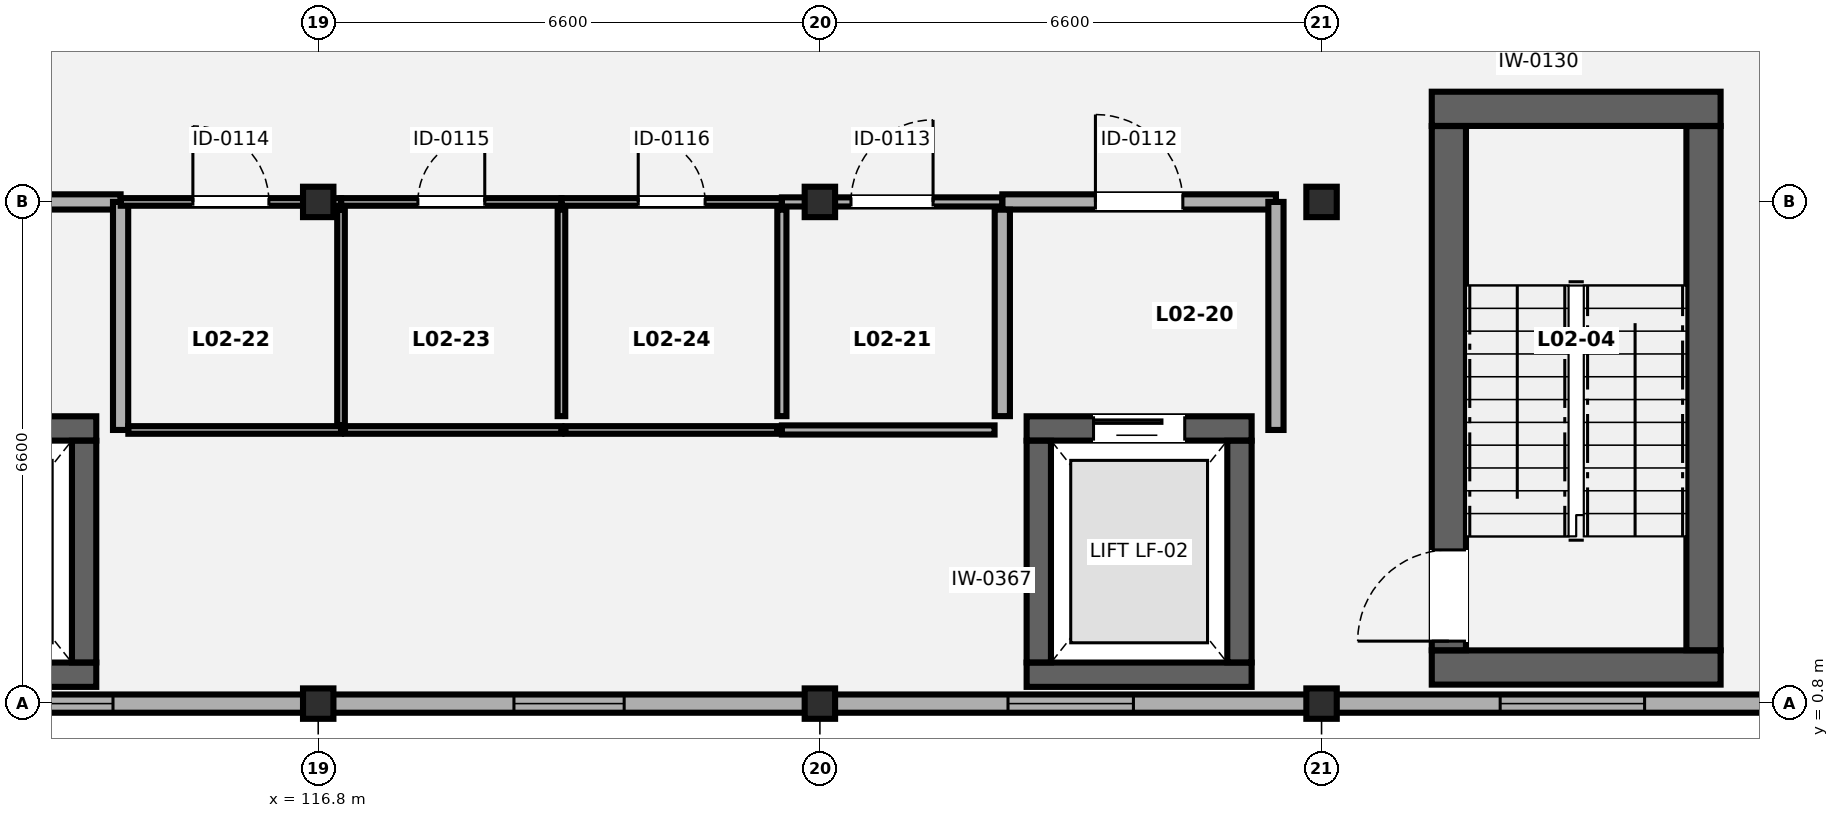
"""IFC4 building model, lengths in metres.
Left out: names, types, materials, properties, quantities, classifications, styles, units other than length and angle.
Written with IfcOpenShell. Run it as: python <this file> out.ifc"""

import sys

from ifc_helpers import new_model, si_unit, direction, frame, frame_2d, origin, origin_2d, place, context, subcontext, project, spatial, rectangle, i_section, extrude, element, fill, save


model = new_model("IFC4")
c1 = context("Model", 3, precision=1e-05, world=origin(), true_north=direction((0.0, 1.0)))
c2 = subcontext(c1, "Body", "Model", "MODEL_VIEW")
j1 = project(units=[si_unit("LENGTHUNIT", "METRE"), si_unit("PLANEANGLEUNIT", "RADIAN")], contexts=[c1])
p1 = place(None, origin())
s1 = spatial("IfcSite", under=j1, at=p1, CompositionType="ELEMENT")
p2 = place(p1, origin())
s2 = spatial("IfcBuilding", under=s1, at=p2, CompositionType="ELEMENT")
p3 = place(p2, frame((0.0, 0.0, 9.1)))
s3 = spatial("IfcBuildingStorey", under=s2, at=p3, CompositionType="ELEMENT", Elevation=9.1)
for number, where, z_axis, x_axis in (
    (1, (116.8, 0.8, 0.0), (0.0, 0.0, 1.0), (1.0, 0.0, 0.0)),
    (2, (116.8, 7.4, 0.0), (0.0, 0.0, 1.0), (1.0, 0.0, 0.0)),
    (3, (123.4, 0.8, 0.0), (0.0, 0.0, 1.0), (1.0, 0.0, 0.0)),
    (4, (123.4, 7.4, 0.0), (0.0, 0.0, 1.0), (1.0, 0.0, 0.0)),
    (5, (130.0, 0.8, 0.0), (0.0, 0.0, 1.0), (1.0, 0.0, 0.0)),
    (6, (130.0, 7.4, 0.0), (0.0, 0.0, 1.0), (1.0, 0.0, 0.0)),
):
    element("IfcColumn", number, at=place(p3, frame(where, z_axis=z_axis, x_axis=x_axis)), inside=s3, PredefinedType="COLUMN", context=c2, shape_type="SweptSolid", body=[
        extrude(i_section(OverallWidth=0.4, OverallDepth=0.4, WebThickness=0.02, FlangeThickness=0.035, FilletRadius=0.016, at=origin_2d()), origin(), (0.0, 0.0, 1.0), 4.2),
    ])
p4 = place(p3, frame((162.002, 0.8, 0.0), z_axis=(0.0, 0.0, 1.0), x_axis=(-1.0, 0.0, 0.0)))
e7 = element("IfcWall", 7, at=p4, inside=s3, PredefinedType="SOLIDWALL", context=c2, shape_type="SweptSolid", body=[
    extrude(rectangle(XDim=58.204, YDim=0.24, at=frame_2d((29.102, 0.0))), origin(), (0.0, 0.0, 1.0), 3.505),
])
p5 = place(p4, frame((53.877, 0.0, 0.85)))
e8 = element("IfcOpeningElement", 8, at=p5, cuts=e7, PredefinedType="OPENING", context=c2, shape_type="SweptSolid", body=[
    extrude(rectangle(XDim=2.45, YDim=1.4, at=frame_2d((1.225, 0.7))), frame((0.0, 0.13, 0.0), z_axis=(0.0, -1.0, 0.0), x_axis=(1.0, 0.0, 0.0)), (0.0, 0.0, 1.0), 0.26),
])
p6 = place(p4, frame((47.902, 0.0, 0.85)))
e9 = element("IfcOpeningElement", 9, at=p6, cuts=e7, PredefinedType="OPENING", context=c2, shape_type="SweptSolid", body=[
    extrude(rectangle(XDim=1.2, YDim=1.25, at=frame_2d((0.6, 0.625))), frame((0.0, 0.13, 0.0), z_axis=(0.0, -1.0, 0.0), x_axis=(1.0, 0.0, 0.0)), (0.0, 0.0, 1.0), 0.26),
])
p7 = place(p4, frame((41.177, 0.0, 0.85)))
e10 = element("IfcOpeningElement", 10, at=p7, cuts=e7, PredefinedType="OPENING", context=c2, shape_type="SweptSolid", body=[
    extrude(rectangle(XDim=1.45, YDim=1.25, at=frame_2d((0.725, 0.625))), frame((0.0, 0.13, 0.0), z_axis=(0.0, -1.0, 0.0), x_axis=(1.0, 0.0, 0.0)), (0.0, 0.0, 1.0), 0.26),
])
p8 = place(p4, frame((34.477, 0.0, 0.85)))
e11 = element("IfcOpeningElement", 11, at=p8, cuts=e7, PredefinedType="OPENING", context=c2, shape_type="SweptSolid", body=[
    extrude(rectangle(XDim=1.65, YDim=1.25, at=frame_2d((0.825, 0.625))), frame((0.0, 0.13, 0.0), z_axis=(0.0, -1.0, 0.0), x_axis=(1.0, 0.0, 0.0)), (0.0, 0.0, 1.0), 0.26),
])
p9 = place(p4, frame((27.752, 0.0, 0.85)))
e12 = element("IfcOpeningElement", 12, at=p9, cuts=e7, PredefinedType="OPENING", context=c2, shape_type="SweptSolid", body=[
    extrude(rectangle(XDim=1.9, YDim=1.25, at=frame_2d((0.95, 0.625))), frame((0.0, 0.13, 0.0), z_axis=(0.0, -1.0, 0.0), x_axis=(1.0, 0.0, 0.0)), (0.0, 0.0, 1.0), 0.26),
])
p10 = place(p4, frame((21.002, 0.0, 0.85)))
e13 = element("IfcOpeningElement", 13, at=p10, cuts=e7, PredefinedType="OPENING", context=c2, shape_type="SweptSolid", body=[
    extrude(rectangle(XDim=2.2, YDim=1.25, at=frame_2d((1.1, 0.625))), frame((0.0, 0.13, 0.0), z_axis=(0.0, -1.0, 0.0), x_axis=(1.0, 0.0, 0.0)), (0.0, 0.0, 1.0), 0.26),
])
p11 = place(p4, frame((14.252, 0.0, 0.85)))
e14 = element("IfcOpeningElement", 14, at=p11, cuts=e7, PredefinedType="OPENING", context=c2, shape_type="SweptSolid", body=[
    extrude(rectangle(XDim=2.5, YDim=1.25, at=frame_2d((1.25, 0.625))), frame((0.0, 0.13, 0.0), z_axis=(0.0, -1.0, 0.0), x_axis=(1.0, 0.0, 0.0)), (0.0, 0.0, 1.0), 0.26),
])
p12 = place(p4, frame((8.452, 0.0, 0.85)))
e15 = element("IfcOpeningElement", 15, at=p12, cuts=e7, PredefinedType="OPENING", context=c2, shape_type="SweptSolid", body=[
    extrude(rectangle(XDim=0.9, YDim=1.35, at=frame_2d((0.45, 0.675))), frame((0.0, 0.13, 0.0), z_axis=(0.0, -1.0, 0.0), x_axis=(1.0, 0.0, 0.0)), (0.0, 0.0, 1.0), 0.26),
])
p13 = place(p4, frame((2.177, 0.0, 0.85)))
e16 = element("IfcOpeningElement", 16, at=p13, cuts=e7, PredefinedType="OPENING", context=c2, shape_type="SweptSolid", body=[
    extrude(rectangle(XDim=1.05, YDim=1.35, at=frame_2d((0.525, 0.675))), frame((0.0, 0.13, 0.0), z_axis=(0.0, -1.0, 0.0), x_axis=(1.0, 0.0, 0.0)), (0.0, 0.0, 1.0), 0.26),
])
for number, where, z_axis, x_axis in (
    (17, (131.45, 1.275, 0.0), (0.0, 0.0, 1.0), (1.0, 0.0, 0.0)),
    (18, (131.45, 8.625, 0.0), (0.0, 0.0, 1.0), (1.0, 0.0, 0.0)),
):
    element("IfcWall", number, at=place(p3, frame(where, z_axis=z_axis, x_axis=x_axis)), inside=s3, PredefinedType="SHEAR", context=c2, shape_type="SweptSolid", body=[
        extrude(rectangle(XDim=3.8, YDim=0.45, at=frame_2d((1.9, 0.0))), origin(), (0.0, 0.0, 1.0), 4.02),
    ])
p14 = place(p3, frame((131.675, 1.502, 0.0), z_axis=(0.0, 0.0, 1.0), x_axis=(0.0, 1.0, 0.0)))
e19 = element("IfcWall", 19, at=p14, inside=s3, PredefinedType="SHEAR", context=c2, shape_type="SweptSolid", body=[
    extrude(rectangle(XDim=6.896, YDim=0.45, at=frame_2d((3.448, 0.0))), origin(), (0.0, 0.0, 1.0), 4.02),
])
p15 = place(p14, frame((0.12, 0.0, 0.0)))
e20 = element("IfcOpeningElement", 20, at=p15, cuts=e19, PredefinedType="OPENING", context=c2, shape_type="SweptSolid", body=[
    extrude(rectangle(XDim=1.2, YDim=2.15, at=frame_2d((0.6, 1.075))), frame((0.0, 0.235, 0.0), z_axis=(0.0, -1.0, 0.0), x_axis=(1.0, 0.0, 0.0)), (0.0, 0.0, 1.0), 0.47),
])
p16 = place(p3, frame((135.025, 1.502, 0.0), z_axis=(0.0, 0.0, 1.0), x_axis=(0.0, 1.0, 0.0)))
e21 = element("IfcWall", 21, at=p16, inside=s3, PredefinedType="SHEAR", context=c2, shape_type="SweptSolid", body=[
    extrude(rectangle(XDim=6.896, YDim=0.45, at=frame_2d((3.448, 0.0))), origin(), (0.0, 0.0, 1.0), 4.02),
])
p17 = place(p3, frame((110.92, 1.18, 0.0), z_axis=(0.0, 0.0, 1.0), x_axis=(1.0, 0.0, 0.0)))
e22 = element("IfcWall", 22, at=p17, inside=s3, PredefinedType="SHEAR", context=c2, shape_type="SweptSolid", body=[
    extrude(rectangle(XDim=2.96, YDim=0.32, at=frame_2d((1.48, 0.0))), origin(), (0.0, 0.0, 1.0), 4.02),
])
p18 = place(p3, frame((110.92, 4.42, 0.0), z_axis=(0.0, 0.0, 1.0), x_axis=(1.0, 0.0, 0.0)))
e23 = element("IfcWall", 23, at=p18, inside=s3, PredefinedType="SHEAR", context=c2, shape_type="SweptSolid", body=[
    extrude(rectangle(XDim=2.96, YDim=0.32, at=frame_2d((1.48, 0.0))), origin(), (0.0, 0.0, 1.0), 4.02),
])
p19 = place(p18, frame((0.88, 0.0, 0.0)))
e24 = element("IfcOpeningElement", 24, at=p19, cuts=e23, PredefinedType="OPENING", context=c2, shape_type="SweptSolid", body=[
    extrude(rectangle(XDim=1.2, YDim=2.2, at=frame_2d((0.6, 1.1))), frame((0.0, 0.17, 0.0), z_axis=(0.0, -1.0, 0.0), x_axis=(1.0, 0.0, 0.0)), (0.0, 0.0, 1.0), 0.34),
])
p20 = place(p3, frame((113.72, 1.342, 0.0), z_axis=(0.0, 0.0, 1.0), x_axis=(0.0, 1.0, 0.0)))
e25 = element("IfcWall", 25, at=p20, inside=s3, PredefinedType="SHEAR", context=c2, shape_type="SweptSolid", body=[
    extrude(rectangle(XDim=2.916, YDim=0.32, at=frame_2d((1.458, 0.0))), origin(), (0.0, 0.0, 1.0), 4.02),
])
p21 = place(p3, frame((126.12, 1.18, 0.0), z_axis=(0.0, 0.0, 1.0), x_axis=(1.0, 0.0, 0.0)))
e26 = element("IfcWall", 26, at=p21, inside=s3, PredefinedType="SHEAR", context=c2, shape_type="SweptSolid", body=[
    extrude(rectangle(XDim=2.96, YDim=0.32, at=frame_2d((1.48, 0.0))), origin(), (0.0, 0.0, 1.0), 4.02),
])
p22 = place(p3, frame((126.12, 4.42, 0.0), z_axis=(0.0, 0.0, 1.0), x_axis=(1.0, 0.0, 0.0)))
e27 = element("IfcWall", 27, at=p22, inside=s3, PredefinedType="SHEAR", context=c2, shape_type="SweptSolid", body=[
    extrude(rectangle(XDim=2.96, YDim=0.32, at=frame_2d((1.48, 0.0))), origin(), (0.0, 0.0, 1.0), 4.02),
])
p23 = place(p22, frame((0.88, 0.0, 0.0)))
e28 = element("IfcOpeningElement", 28, at=p23, cuts=e27, PredefinedType="OPENING", context=c2, shape_type="SweptSolid", body=[
    extrude(rectangle(XDim=1.2, YDim=2.2, at=frame_2d((0.6, 1.1))), frame((0.0, 0.17, 0.0), z_axis=(0.0, -1.0, 0.0), x_axis=(1.0, 0.0, 0.0)), (0.0, 0.0, 1.0), 0.34),
])
for number, where, z_axis, x_axis in (
    (29, (126.28, 1.342, 0.0), (0.0, 0.0, 1.0), (0.0, 1.0, 0.0)),
    (30, (128.92, 1.342, 0.0), (0.0, 0.0, 1.0), (0.0, 1.0, 0.0)),
):
    element("IfcWall", number, at=place(p3, frame(where, z_axis=z_axis, x_axis=x_axis)), inside=s3, PredefinedType="SHEAR", context=c2, shape_type="SweptSolid", body=[
        extrude(rectangle(XDim=2.916, YDim=0.32, at=frame_2d((1.458, 0.0))), origin(), (0.0, 0.0, 1.0), 4.02),
    ])
p24 = place(p3, frame((110.6, 7.4, 0.0), z_axis=(0.0, 0.0, 1.0), x_axis=(1.0, 0.0, 0.0)))
e31 = element("IfcWall", 31, at=p24, inside=s3, PredefinedType="SOLIDWALL", context=c2, shape_type="SweptSolid", body=[
    extrude(rectangle(XDim=3.6, YDim=0.2, at=frame_2d((1.8, 0.0))), origin(), (0.0, 0.0, 1.0), 3.293),
])
p25 = place(p24, frame((1.225, 0.0, 0.0)))
e32 = element("IfcOpeningElement", 32, at=p25, cuts=e31, PredefinedType="OPENING", context=c2, shape_type="SweptSolid", body=[
    extrude(rectangle(XDim=1.15, YDim=2.15, at=frame_2d((0.575, 1.075))), frame((0.0, 0.11, 0.0), z_axis=(0.0, -1.0, 0.0), x_axis=(1.0, 0.0, 0.0)), (0.0, 0.0, 1.0), 0.22),
])
p26 = place(p3, frame((114.2, 4.4, 0.0), z_axis=(0.0, 0.0, 1.0), x_axis=(0.0, 1.0, 0.0)))
e33 = element("IfcWall", 33, at=p26, inside=s3, PredefinedType="SOLIDWALL", context=c2, shape_type="SweptSolid", body=[
    extrude(rectangle(XDim=3.0, YDim=0.2, at=frame_2d((1.5, 0.0))), origin(), (0.0, 0.0, 1.0), 4.02),
])
p27 = place(p3, frame((125.8, 7.4, 0.0), z_axis=(0.0, 0.0, 1.0), x_axis=(1.0, 0.0, 0.0)))
e34 = element("IfcWall", 34, at=p27, inside=s3, PredefinedType="SOLIDWALL", context=c2, shape_type="SweptSolid", body=[
    extrude(rectangle(XDim=3.6, YDim=0.2, at=frame_2d((1.8, 0.0))), origin(), (0.0, 0.0, 1.0), 3.293),
])
p28 = place(p27, frame((1.225, 0.0, 0.0)))
e35 = element("IfcOpeningElement", 35, at=p28, cuts=e34, PredefinedType="OPENING", context=c2, shape_type="SweptSolid", body=[
    extrude(rectangle(XDim=1.15, YDim=2.15, at=frame_2d((0.575, 1.075))), frame((0.0, 0.11, 0.0), z_axis=(0.0, -1.0, 0.0), x_axis=(1.0, 0.0, 0.0)), (0.0, 0.0, 1.0), 0.22),
])
p29 = place(p3, frame((125.8, 4.582, 0.0), z_axis=(0.0, 0.0, 1.0), x_axis=(0.0, 1.0, 0.0)))
e36 = element("IfcWall", 36, at=p29, inside=s3, PredefinedType="SOLIDWALL", context=c2, shape_type="SweptSolid", body=[
    extrude(rectangle(XDim=2.716, YDim=0.2, at=frame_2d((1.358, 0.0))), origin(), (0.0, 0.0, 1.0), 4.02),
])
p30 = place(p3, frame((129.4, 4.4, 0.0), z_axis=(0.0, 0.0, 1.0), x_axis=(0.0, 1.0, 0.0)))
e37 = element("IfcWall", 37, at=p30, inside=s3, PredefinedType="SOLIDWALL", context=c2, shape_type="SweptSolid", body=[
    extrude(rectangle(XDim=3.0, YDim=0.2, at=frame_2d((1.5, 0.0))), origin(), (0.0, 0.0, 1.0), 4.02),
])
p31 = place(p3, frame((122.9, 4.4, 0.0), z_axis=(0.0, 0.0, 1.0), x_axis=(1.0, 0.0, 0.0)))
e38 = element("IfcWall", 38, at=p31, inside=s3, PredefinedType="PARTITIONING", context=c2, shape_type="SweptSolid", body=[
    extrude(rectangle(XDim=2.798, YDim=0.12, at=frame_2d((1.399, 0.0))), origin(), (0.0, 0.0, 1.0), 4.02),
])
p32 = place(p3, frame((122.9, 7.4, 0.0), z_axis=(0.0, 0.0, 1.0), x_axis=(1.0, 0.0, 0.0)))
e39 = element("IfcWall", 39, at=p32, inside=s3, PredefinedType="PARTITIONING", context=c2, shape_type="SweptSolid", body=[
    extrude(rectangle(XDim=2.898, YDim=0.12, at=frame_2d((1.449, 0.0))), origin(), (0.0, 0.0, 1.0), 3.293),
])
p33 = place(p32, frame((0.909, 0.0, 0.0)))
e40 = element("IfcOpeningElement", 40, at=p33, cuts=e39, PredefinedType="OPENING", context=c2, shape_type="SweptSolid", body=[
    extrude(rectangle(XDim=1.08, YDim=2.12, at=frame_2d((0.54, 1.06))), frame((0.0, 0.07, 0.0), z_axis=(0.0, -1.0, 0.0), x_axis=(1.0, 0.0, 0.0)), (0.0, 0.0, 1.0), 0.14),
])
p34 = place(p3, frame((122.9, 4.582, 0.0), z_axis=(0.0, 0.0, 1.0), x_axis=(0.0, 1.0, 0.0)))
e41 = element("IfcWall", 41, at=p34, inside=s3, PredefinedType="PARTITIONING", context=c2, shape_type="SweptSolid", body=[
    extrude(rectangle(XDim=2.716, YDim=0.12, at=frame_2d((1.358, 0.0))), origin(), (0.0, 0.0, 1.0), 4.02),
])
p35 = place(p3, frame((114.302, 4.4, 0.0), z_axis=(0.0, 0.0, 1.0), x_axis=(1.0, 0.0, 0.0)))
e42 = element("IfcWall", 42, at=p35, inside=s3, PredefinedType="PARTITIONING", context=c2, shape_type="SweptSolid", body=[
    extrude(rectangle(XDim=2.798, YDim=0.1, at=frame_2d((1.399, 0.0))), origin(), (0.0, 0.0, 1.0), 4.02),
])
p36 = place(p3, frame((114.202, 7.4, 0.0), z_axis=(0.0, 0.0, 1.0), x_axis=(1.0, 0.0, 0.0)))
e43 = element("IfcWall", 43, at=p36, inside=s3, PredefinedType="PARTITIONING", context=c2, shape_type="SweptSolid", body=[
    extrude(rectangle(XDim=2.898, YDim=0.1, at=frame_2d((1.449, 0.0))), origin(), (0.0, 0.0, 1.0), 3.293),
])
p37 = place(p36, frame((0.949, 0.0, 0.0)))
e44 = element("IfcOpeningElement", 44, at=p37, cuts=e43, PredefinedType="OPENING", context=c2, shape_type="SweptSolid", body=[
    extrude(rectangle(XDim=1.0, YDim=2.1, at=frame_2d((0.5, 1.05))), frame((0.0, 0.06, 0.0), z_axis=(0.0, -1.0, 0.0), x_axis=(1.0, 0.0, 0.0)), (0.0, 0.0, 1.0), 0.12),
])
p38 = place(p3, frame((117.1, 4.462, 0.0), z_axis=(0.0, 0.0, 1.0), x_axis=(0.0, 1.0, 0.0)))
e45 = element("IfcWall", 45, at=p38, inside=s3, PredefinedType="PARTITIONING", context=c2, shape_type="SweptSolid", body=[
    extrude(rectangle(XDim=2.836, YDim=0.1, at=frame_2d((1.418, 0.0))), origin(), (0.0, 0.0, 1.0), 4.02),
])
p39 = place(p3, frame((117.152, 4.4, 0.0), z_axis=(0.0, 0.0, 1.0), x_axis=(1.0, 0.0, 0.0)))
e46 = element("IfcWall", 46, at=p39, inside=s3, PredefinedType="PARTITIONING", context=c2, shape_type="SweptSolid", body=[
    extrude(rectangle(XDim=2.848, YDim=0.1, at=frame_2d((1.424, 0.0))), origin(), (0.0, 0.0, 1.0), 4.02),
])
p40 = place(p3, frame((117.102, 7.4, 0.0), z_axis=(0.0, 0.0, 1.0), x_axis=(1.0, 0.0, 0.0)))
e47 = element("IfcWall", 47, at=p40, inside=s3, PredefinedType="PARTITIONING", context=c2, shape_type="SweptSolid", body=[
    extrude(rectangle(XDim=2.898, YDim=0.1, at=frame_2d((1.449, 0.0))), origin(), (0.0, 0.0, 1.0), 3.293),
])
p41 = place(p40, frame((1.009, 0.0, 0.0)))
e48 = element("IfcOpeningElement", 48, at=p41, cuts=e47, PredefinedType="OPENING", context=c2, shape_type="SweptSolid", body=[
    extrude(rectangle(XDim=0.88, YDim=2.08, at=frame_2d((0.44, 1.04))), frame((0.0, 0.06, 0.0), z_axis=(0.0, -1.0, 0.0), x_axis=(1.0, 0.0, 0.0)), (0.0, 0.0, 1.0), 0.12),
])
p42 = place(p3, frame((120.0, 4.582, 0.0), z_axis=(0.0, 0.0, 1.0), x_axis=(0.0, 1.0, 0.0)))
e49 = element("IfcWall", 49, at=p42, inside=s3, PredefinedType="PARTITIONING", context=c2, shape_type="SweptSolid", body=[
    extrude(rectangle(XDim=2.716, YDim=0.1, at=frame_2d((1.358, 0.0))), origin(), (0.0, 0.0, 1.0), 4.02),
])
p43 = place(p3, frame((120.052, 4.4, 0.0), z_axis=(0.0, 0.0, 1.0), x_axis=(1.0, 0.0, 0.0)))
e50 = element("IfcWall", 50, at=p43, inside=s3, PredefinedType="PARTITIONING", context=c2, shape_type="SweptSolid", body=[
    extrude(rectangle(XDim=2.786, YDim=0.1, at=frame_2d((1.393, 0.0))), origin(), (0.0, 0.0, 1.0), 4.02),
])
p44 = place(p3, frame((120.002, 7.4, 0.0), z_axis=(0.0, 0.0, 1.0), x_axis=(1.0, 0.0, 0.0)))
e51 = element("IfcWall", 51, at=p44, inside=s3, PredefinedType="PARTITIONING", context=c2, shape_type="SweptSolid", body=[
    extrude(rectangle(XDim=2.896, YDim=0.1, at=frame_2d((1.448, 0.0))), origin(), (0.0, 0.0, 1.0), 3.293),
])
p45 = place(p44, frame((1.008, 0.0, 0.0)))
e52 = element("IfcOpeningElement", 52, at=p45, cuts=e51, PredefinedType="OPENING", context=c2, shape_type="SweptSolid", body=[
    extrude(rectangle(XDim=0.88, YDim=2.08, at=frame_2d((0.44, 1.04))), frame((0.0, 0.06, 0.0), z_axis=(0.0, -1.0, 0.0), x_axis=(1.0, 0.0, 0.0)), (0.0, 0.0, 1.0), 0.12),
])
p46 = place(p6, origin())
e53 = element("IfcWindow", 53, at=p46, inside=s3, PartitioningType="SINGLE_PANEL", PredefinedType="WINDOW", context=c2, shape_type="SweptSolid", body=[
    extrude(rectangle(XDim=1.2, YDim=1.25, at=frame_2d((0.6, 0.625))), frame((0.0, 0.03, 0.0), z_axis=(0.0, -1.0, 0.0), x_axis=(1.0, 0.0, 0.0)), (0.0, 0.0, 1.0), 0.06),
])
fill(e9, e53)
p47 = place(p7, origin())
e54 = element("IfcWindow", 54, at=p47, inside=s3, PartitioningType="SINGLE_PANEL", PredefinedType="WINDOW", context=c2, shape_type="SweptSolid", body=[
    extrude(rectangle(XDim=1.45, YDim=1.25, at=frame_2d((0.725, 0.625))), frame((0.0, 0.03, 0.0), z_axis=(0.0, -1.0, 0.0), x_axis=(1.0, 0.0, 0.0)), (0.0, 0.0, 1.0), 0.06),
])
fill(e10, e54)
p48 = place(p8, origin())
e55 = element("IfcWindow", 55, at=p48, inside=s3, PartitioningType="SINGLE_PANEL", PredefinedType="WINDOW", context=c2, shape_type="SweptSolid", body=[
    extrude(rectangle(XDim=1.65, YDim=1.25, at=frame_2d((0.825, 0.625))), frame((0.0, 0.03, 0.0), z_axis=(0.0, -1.0, 0.0), x_axis=(1.0, 0.0, 0.0)), (0.0, 0.0, 1.0), 0.06),
])
fill(e11, e55)
p49 = place(p9, origin())
e56 = element("IfcWindow", 56, at=p49, inside=s3, PartitioningType="SINGLE_PANEL", PredefinedType="WINDOW", context=c2, shape_type="SweptSolid", body=[
    extrude(rectangle(XDim=1.9, YDim=1.25, at=frame_2d((0.95, 0.625))), frame((0.0, 0.03, 0.0), z_axis=(0.0, -1.0, 0.0), x_axis=(1.0, 0.0, 0.0)), (0.0, 0.0, 1.0), 0.06),
])
fill(e12, e56)
p50 = place(p15, origin())
e57 = element("IfcDoor", 57, at=p50, inside=s3, OperationType="SINGLE_SWING_LEFT", PredefinedType="DOOR", context=c2, shape_type="SweptSolid", body=[
    extrude(rectangle(XDim=1.2, YDim=2.15, at=frame_2d((0.6, 1.075))), frame((0.0, 0.025, 0.0), z_axis=(0.0, -1.0, 0.0), x_axis=(1.0, 0.0, 0.0)), (0.0, 0.0, 1.0), 0.05),
])
fill(e20, e57)
p51 = place(p23, origin())
e58 = element("IfcDoor", 58, at=p51, inside=s3, OperationType="SLIDING_TO_LEFT", PredefinedType="DOOR", context=c2, shape_type="SweptSolid", body=[
    extrude(rectangle(XDim=1.2, YDim=2.2, at=frame_2d((0.6, 1.1))), frame((0.0, 0.025, 0.0), z_axis=(0.0, -1.0, 0.0), x_axis=(1.0, 0.0, 0.0)), (0.0, 0.0, 1.0), 0.05),
])
fill(e28, e58)
p52 = place(p28, origin())
e59 = element("IfcDoor", 59, at=p52, inside=s3, OperationType="SINGLE_SWING_LEFT", PredefinedType="DOOR", context=c2, shape_type="SweptSolid", body=[
    extrude(rectangle(XDim=1.15, YDim=2.15, at=frame_2d((0.575, 1.075))), frame((0.0, 0.025, 0.0), z_axis=(0.0, -1.0, 0.0), x_axis=(1.0, 0.0, 0.0)), (0.0, 0.0, 1.0), 0.05),
])
fill(e35, e59)
p53 = place(p33, origin())
e60 = element("IfcDoor", 60, at=p53, inside=s3, OperationType="SINGLE_SWING_RIGHT", PredefinedType="DOOR", context=c2, shape_type="SweptSolid", body=[
    extrude(rectangle(XDim=1.08, YDim=2.12, at=frame_2d((0.54, 1.06))), frame((0.0, 0.025, 0.0), z_axis=(0.0, -1.0, 0.0), x_axis=(1.0, 0.0, 0.0)), (0.0, 0.0, 1.0), 0.05),
])
fill(e40, e60)
p54 = place(p37, origin())
e61 = element("IfcDoor", 61, at=p54, inside=s3, OperationType="SINGLE_SWING_LEFT", PredefinedType="DOOR", context=c2, shape_type="SweptSolid", body=[
    extrude(rectangle(XDim=1.0, YDim=2.1, at=frame_2d((0.5, 1.05))), frame((0.0, 0.025, 0.0), z_axis=(0.0, -1.0, 0.0), x_axis=(1.0, 0.0, 0.0)), (0.0, 0.0, 1.0), 0.05),
])
fill(e44, e61)
p55 = place(p41, origin())
e62 = element("IfcDoor", 62, at=p55, inside=s3, OperationType="SINGLE_SWING_RIGHT", PredefinedType="DOOR", context=c2, shape_type="SweptSolid", body=[
    extrude(rectangle(XDim=0.88, YDim=2.08, at=frame_2d((0.44, 1.04))), frame((0.0, 0.025, 0.0), z_axis=(0.0, -1.0, 0.0), x_axis=(1.0, 0.0, 0.0)), (0.0, 0.0, 1.0), 0.05),
])
fill(e48, e62)
p56 = place(p45, origin())
e63 = element("IfcDoor", 63, at=p56, inside=s3, OperationType="SINGLE_SWING_LEFT", PredefinedType="DOOR", context=c2, shape_type="SweptSolid", body=[
    extrude(rectangle(XDim=0.88, YDim=2.08, at=frame_2d((0.44, 1.04))), frame((0.0, 0.025, 0.0), z_axis=(0.0, -1.0, 0.0), x_axis=(1.0, 0.0, 0.0)), (0.0, 0.0, 1.0), 0.05),
])
fill(e52, e63)
save(model, sys.argv[1])
